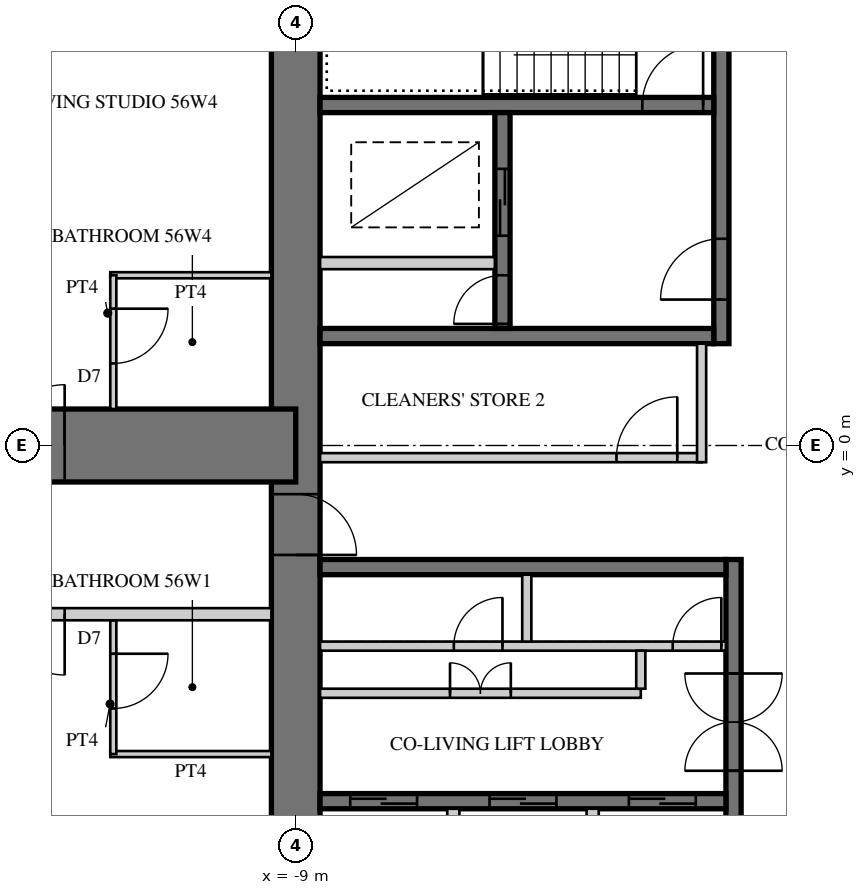
"""IFC4 building model, lengths in metres.
Left out: names, types, materials, properties, quantities, classifications, styles, units other than length and angle.
Written with IfcOpenShell. Run it as: python <this file> out.ifc"""

import sys

from ifc_helpers import new_model, si_unit, direction, frame, frame_2d, origin, place, context, subcontext, project, spatial, rectangle, extrude, element, fill, save


model = new_model("IFC4")
c1 = context("Model", 3, precision=1e-05, world=origin(), true_north=direction((0.0, 1.0)))
c2 = subcontext(c1, "Body", "Model", "MODEL_VIEW")
j1 = project(units=[si_unit("LENGTHUNIT", "METRE"), si_unit("PLANEANGLEUNIT", "RADIAN")], contexts=[c1])
p1 = place(None, origin())
s1 = spatial("IfcSite", under=j1, at=p1, CompositionType="ELEMENT")
p2 = place(p1, origin())
s2 = spatial("IfcBuilding", under=s1, at=p2, CompositionType="ELEMENT")
p3 = place(p2, frame((0.0, 0.0, 222.1)))
s3 = spatial("IfcBuildingStorey", under=s2, at=p3, CompositionType="ELEMENT", Elevation=222.1)
p4 = place(p3, frame((-9.0, 9.0, 0.0), z_axis=(0.0, 0.0, 1.0), x_axis=(0.0, -1.0, 0.0)))
e1 = element("IfcWall", 1, at=p4, inside=s3, PredefinedType="SHEAR", context=c2, shape_type="SweptSolid", body=[
    extrude(rectangle(XDim=18.0, YDim=0.8, at=frame_2d((9.0, 0.0))), origin(), (0.0, 0.0, 1.0), 3.4),
])
p5 = place(p4, frame((9.8, 0.0, 0.0)))
e2 = element("IfcOpeningElement", 2, at=p5, cuts=e1, PredefinedType="OPENING", context=c2, shape_type="SweptSolid", body=[
    extrude(rectangle(XDim=1.0, YDim=2.4, at=frame_2d((0.5, 1.2))), frame((0.0, 0.41, 0.0), z_axis=(0.0, -1.0, 0.0), x_axis=(1.0, 0.0, 0.0)), (0.0, 0.0, 1.0), 0.82),
])
p6 = place(p3, frame((-2.0, 1.675, 0.0), z_axis=(0.0, 0.0, 1.0), x_axis=(0.0, 1.0, 0.0)))
e3 = element("IfcWall", 3, at=p6, inside=s3, PredefinedType="SHEAR", context=c2, shape_type="SweptSolid", body=[
    extrude(rectangle(XDim=6.925, YDim=0.25, at=frame_2d((3.462, 0.0))), origin(), (0.0, 0.0, 1.0), 3.4),
])
p7 = place(p6, frame((0.725, 0.0, 0.0)))
e4 = element("IfcOpeningElement", 4, at=p7, cuts=e3, PredefinedType="OPENING", context=c2, shape_type="SweptSolid", body=[
    extrude(rectangle(XDim=1.0, YDim=2.1, at=frame_2d((0.5, 1.05))), frame((0.0, 0.135, 0.0), z_axis=(0.0, -1.0, 0.0), x_axis=(1.0, 0.0, 0.0)), (0.0, 0.0, 1.0), 0.27),
])
p8 = place(p3, frame((-2.125, 1.8, 0.0), z_axis=(0.0, 0.0, 1.0), x_axis=(-1.0, 0.0, 0.0)))
e5 = element("IfcWall", 5, at=p8, inside=s3, PredefinedType="SHEAR", context=c2, shape_type="SweptSolid", body=[
    extrude(rectangle(XDim=6.475, YDim=0.25, at=frame_2d((3.238, 0.0))), origin(), (0.0, 0.0, 1.0), 3.4),
])
p9 = place(p3, frame((-2.125, 5.6, 0.0), z_axis=(0.0, 0.0, 1.0), x_axis=(-1.0, 0.0, 0.0)))
e6 = element("IfcWall", 6, at=p9, inside=s3, PredefinedType="SHEAR", context=c2, shape_type="SweptSolid", body=[
    extrude(rectangle(XDim=6.475, YDim=0.25, at=frame_2d((3.238, 0.0))), origin(), (0.0, 0.0, 1.0), 3.4),
])
p10 = place(p9, frame((0.175, 0.0, 0.0)))
e7 = element("IfcOpeningElement", 7, at=p10, cuts=e6, PredefinedType="OPENING", context=c2, shape_type="SweptSolid", body=[
    extrude(rectangle(XDim=1.0, YDim=2.1, at=frame_2d((0.5, 1.05))), frame((0.0, 0.135, 0.0), z_axis=(0.0, -1.0, 0.0), x_axis=(1.0, 0.0, 0.0)), (0.0, 0.0, 1.0), 0.27),
])
p11 = place(p3, frame((-5.6, 1.925, 0.0), z_axis=(0.0, 0.0, 1.0), x_axis=(0.0, 1.0, 0.0)))
e8 = element("IfcWall", 8, at=p11, inside=s3, PredefinedType="SHEAR", context=c2, shape_type="SweptSolid", body=[
    extrude(rectangle(XDim=3.55, YDim=0.25, at=frame_2d((1.775, 0.0))), origin(), (0.0, 0.0, 1.0), 3.4),
])
p12 = place(p11, frame((1.525, 0.0, 0.0)))
e9 = element("IfcOpeningElement", 9, at=p12, cuts=e8, PredefinedType="OPENING", context=c2, shape_type="SweptSolid", body=[
    extrude(rectangle(XDim=1.1, YDim=2.2, at=frame_2d((0.55, 1.1))), frame((0.0, 0.135, 0.0), z_axis=(0.0, -1.0, 0.0), x_axis=(1.0, 0.0, 0.0)), (0.0, 0.0, 1.0), 0.27),
])
p13 = place(p11, frame((0.075, 0.0, 0.0)))
e10 = element("IfcOpeningElement", 10, at=p13, cuts=e8, PredefinedType="OPENING", context=c2, shape_type="SweptSolid", body=[
    extrude(rectangle(XDim=0.8, YDim=2.1, at=frame_2d((0.4, 1.05))), frame((0.0, 0.135, 0.0), z_axis=(0.0, -1.0, 0.0), x_axis=(1.0, 0.0, 0.0)), (0.0, 0.0, 1.0), 0.27),
])
p14 = place(p3, frame((-5.725, 3.0, 0.0), z_axis=(0.0, 0.0, 1.0), x_axis=(-1.0, 0.0, 0.0)))
e11 = element("IfcWall", 11, at=p14, inside=s3, PredefinedType="PARTITIONING", context=c2, shape_type="SweptSolid", body=[
    extrude(rectangle(XDim=2.875, YDim=0.2, at=frame_2d((1.438, 0.0))), origin(), (0.0, 0.0, 1.0), 3.4),
])
p15 = place(p3, frame((-1.8, -1.875, 0.0), z_axis=(0.0, 0.0, 1.0), x_axis=(0.0, -1.0, 0.0)))
e12 = element("IfcWall", 12, at=p15, inside=s3, PredefinedType="SHEAR", context=c2, shape_type="SweptSolid", body=[
    extrude(rectangle(XDim=6.725, YDim=0.25, at=frame_2d((3.363, 0.0))), origin(), (0.0, 0.0, 1.0), 3.4),
])
p16 = place(p15, frame((1.875, 0.0, 0.0)))
e13 = element("IfcOpeningElement", 13, at=p16, cuts=e12, PredefinedType="OPENING", context=c2, shape_type="SweptSolid", body=[
    extrude(rectangle(XDim=1.6, YDim=2.4, at=frame_2d((0.8, 1.2))), frame((0.0, 0.135, 0.0), z_axis=(0.0, -1.0, 0.0), x_axis=(1.0, 0.0, 0.0)), (0.0, 0.0, 1.0), 0.27),
])
p17 = place(p3, frame((-1.925, -2.0, 0.0), z_axis=(0.0, 0.0, 1.0), x_axis=(-1.0, 0.0, 0.0)))
e14 = element("IfcWall", 14, at=p17, inside=s3, PredefinedType="SHEAR", context=c2, shape_type="SweptSolid", body=[
    extrude(rectangle(XDim=6.675, YDim=0.25, at=frame_2d((3.337, 0.0))), origin(), (0.0, 0.0, 1.0), 3.4),
])
p18 = place(p3, frame((-1.925, -5.85, 0.0), z_axis=(0.0, 0.0, 1.0), x_axis=(-1.0, 0.0, 0.0)))
e15 = element("IfcWall", 15, at=p18, inside=s3, PredefinedType="SHEAR", context=c2, shape_type="SweptSolid", body=[
    extrude(rectangle(XDim=6.675, YDim=0.25, at=frame_2d((3.337, 0.0))), origin(), (0.0, 0.0, 1.0), 3.4),
])
p19 = place(p18, frame((0.496, 0.0, 0.0)))
e16 = element("IfcOpeningElement", 16, at=p19, cuts=e15, PredefinedType="OPENING", context=c2, shape_type="SweptSolid", body=[
    extrude(rectangle(XDim=1.1, YDim=2.2, at=frame_2d((0.55, 1.1))), frame((0.0, 0.135, 0.0), z_axis=(0.0, -1.0, 0.0), x_axis=(1.0, 0.0, 0.0)), (0.0, 0.0, 1.0), 0.27),
])
p20 = place(p18, frame((2.788, 0.0, 0.0)))
e17 = element("IfcOpeningElement", 17, at=p20, cuts=e15, PredefinedType="OPENING", context=c2, shape_type="SweptSolid", body=[
    extrude(rectangle(XDim=1.1, YDim=2.2, at=frame_2d((0.55, 1.1))), frame((0.0, 0.135, 0.0), z_axis=(0.0, -1.0, 0.0), x_axis=(1.0, 0.0, 0.0)), (0.0, 0.0, 1.0), 0.27),
])
p21 = place(p18, frame((5.079, 0.0, 0.0)))
e18 = element("IfcOpeningElement", 18, at=p21, cuts=e15, PredefinedType="OPENING", context=c2, shape_type="SweptSolid", body=[
    extrude(rectangle(XDim=1.1, YDim=2.2, at=frame_2d((0.55, 1.1))), frame((0.0, 0.135, 0.0), z_axis=(0.0, -1.0, 0.0), x_axis=(1.0, 0.0, 0.0)), (0.0, 0.0, 1.0), 0.27),
])
p22 = place(p3, frame((-1.925, -3.3, 0.0), z_axis=(0.0, 0.0, 1.0), x_axis=(-1.0, 0.0, 0.0)))
e19 = element("IfcWall", 19, at=p22, inside=s3, PredefinedType="PARTITIONING", context=c2, shape_type="SweptSolid", body=[
    extrude(rectangle(XDim=6.675, YDim=0.15, at=frame_2d((3.337, 0.0))), origin(), (0.0, 0.0, 1.0), 3.4),
])
p23 = place(p22, frame((0.075, 0.0, 0.0)))
e20 = element("IfcOpeningElement", 20, at=p23, cuts=e19, PredefinedType="OPENING", context=c2, shape_type="SweptSolid", body=[
    extrude(rectangle(XDim=0.8, YDim=2.1, at=frame_2d((0.4, 1.05))), frame((0.0, 0.085, 0.0), z_axis=(0.0, -1.0, 0.0), x_axis=(1.0, 0.0, 0.0)), (0.0, 0.0, 1.0), 0.17),
])
p24 = place(p22, frame((3.675, 0.0, 0.0)))
e21 = element("IfcOpeningElement", 21, at=p24, cuts=e19, PredefinedType="OPENING", context=c2, shape_type="SweptSolid", body=[
    extrude(rectangle(XDim=0.8, YDim=2.1, at=frame_2d((0.4, 1.05))), frame((0.0, 0.085, 0.0), z_axis=(0.0, -1.0, 0.0), x_axis=(1.0, 0.0, 0.0)), (0.0, 0.0, 1.0), 0.17),
])
p25 = place(p3, frame((-5.2, -2.125, 0.0), z_axis=(0.0, 0.0, 1.0), x_axis=(0.0, -1.0, 0.0)))
e22 = element("IfcWall", 22, at=p25, inside=s3, PredefinedType="PARTITIONING", context=c2, shape_type="SweptSolid", body=[
    extrude(rectangle(XDim=1.1, YDim=0.15, at=frame_2d((0.55, 0.0))), origin(), (0.0, 0.0, 1.0), 3.4),
])
for number, where, z_axis, x_axis in (
    (23, (-4.117, -5.975, 0.0), (0.0, 0.0, 1.0), (0.0, -1.0, 0.0)),
    (24, (-6.408, -5.975, 0.0), (0.0, 0.0, 1.0), (0.0, -1.0, 0.0)),
):
    element("IfcWall", number, at=place(p3, frame(where, z_axis=z_axis, x_axis=x_axis)), inside=s3, PredefinedType="PARTITIONING", context=c2, shape_type="SweptSolid", body=[
        extrude(rectangle(XDim=2.625, YDim=0.2, at=frame_2d((1.312, 0.0))), origin(), (0.0, 0.0, 1.0), 3.4),
    ])
p26 = place(p3, frame((-9.0, 0.0, 0.0), z_axis=(0.0, 0.0, 1.0), x_axis=(-1.0, 0.0, 0.0)))
e25 = element("IfcWall", 25, at=p26, inside=s3, PredefinedType="SHEAR", context=c2, shape_type="SweptSolid", body=[
    extrude(rectangle(XDim=18.0, YDim=1.2, at=frame_2d((9.0, 0.0))), origin(), (0.0, 0.0, 1.0), 3.4),
])
p27 = place(p26, frame((3.8, 0.0, 0.0)))
e26 = element("IfcOpeningElement", 26, at=p27, cuts=e25, PredefinedType="OPENING", context=c2, shape_type="SweptSolid", body=[
    extrude(rectangle(XDim=1.0, YDim=2.15, at=frame_2d((0.5, 1.075))), frame((0.0, 0.61, 0.0), z_axis=(0.0, -1.0, 0.0), x_axis=(1.0, 0.0, 0.0)), (0.0, 0.0, 1.0), 1.22),
])
p28 = place(p26, frame((6.6, 0.0, 0.0)))
e27 = element("IfcOpeningElement", 27, at=p28, cuts=e25, PredefinedType="OPENING", context=c2, shape_type="SweptSolid", body=[
    extrude(rectangle(XDim=1.0, YDim=2.15, at=frame_2d((0.5, 1.075))), frame((0.0, 0.61, 0.0), z_axis=(0.0, -1.0, 0.0), x_axis=(1.0, 0.0, 0.0)), (0.0, 0.0, 1.0), 1.22),
])
p29 = place(p26, frame((13.3, 0.0, 0.0)))
e28 = element("IfcOpeningElement", 28, at=p29, cuts=e25, PredefinedType="OPENING", context=c2, shape_type="SweptSolid", body=[
    extrude(rectangle(XDim=1.0, YDim=2.2, at=frame_2d((0.5, 1.1))), frame((0.0, 0.61, 0.0), z_axis=(0.0, -1.0, 0.0), x_axis=(1.0, 0.0, 0.0)), (0.0, 0.0, 1.0), 1.22),
])
p30 = place(p3, frame((-2.325, -0.2, 0.0), z_axis=(0.0, 0.0, 1.0), x_axis=(-1.0, 0.0, 0.0)))
e29 = element("IfcWall", 29, at=p30, inside=s3, PredefinedType="PARTITIONING", context=c2, shape_type="SweptSolid", body=[
    extrude(rectangle(XDim=6.275, YDim=0.15, at=frame_2d((3.138, 0.0))), origin(), (0.0, 0.0, 1.0), 3.22),
])
p31 = place(p30, frame((0.4, 0.0, 0.0)))
e30 = element("IfcOpeningElement", 30, at=p31, cuts=e29, PredefinedType="OPENING", context=c2, shape_type="SweptSolid", body=[
    extrude(rectangle(XDim=1.0, YDim=2.1, at=frame_2d((0.5, 1.05))), frame((0.0, 0.085, 0.0), z_axis=(0.0, -1.0, 0.0), x_axis=(1.0, 0.0, 0.0)), (0.0, 0.0, 1.0), 0.17),
])
p32 = place(p3, frame((-2.325, 1.675, 0.0), z_axis=(0.0, 0.0, 1.0), x_axis=(0.0, -1.0, 0.0)))
e31 = element("IfcWall", 31, at=p32, inside=s3, PredefinedType="PARTITIONING", context=c2, shape_type="SweptSolid", body=[
    extrude(rectangle(XDim=1.95, YDim=0.15, at=frame_2d((0.975, 0.0))), origin(), (0.0, 0.0, 1.0), 3.22),
])
p33 = place(p3, frame((-3.325, -4.075, 0.0), z_axis=(0.0, 0.0, 1.0), x_axis=(-1.0, 0.0, 0.0)))
e32 = element("IfcWall", 32, at=p33, inside=s3, PredefinedType="PARTITIONING", context=c2, shape_type="SweptSolid", body=[
    extrude(rectangle(XDim=5.275, YDim=0.15, at=frame_2d((2.638, 0.0))), origin(), (0.0, 0.0, 1.0), 3.22),
])
p34 = place(p33, frame((2.137, 0.0, 0.0)))
e33 = element("IfcOpeningElement", 33, at=p34, cuts=e32, PredefinedType="OPENING", context=c2, shape_type="SweptSolid", body=[
    extrude(rectangle(XDim=1.0, YDim=2.1, at=frame_2d((0.5, 1.05))), frame((0.0, 0.085, 0.0), z_axis=(0.0, -1.0, 0.0), x_axis=(1.0, 0.0, 0.0)), (0.0, 0.0, 1.0), 0.17),
])
p35 = place(p3, frame((-3.325, -3.375, 0.0), z_axis=(0.0, 0.0, 1.0), x_axis=(0.0, -1.0, 0.0)))
e34 = element("IfcWall", 34, at=p35, inside=s3, PredefinedType="PARTITIONING", context=c2, shape_type="SweptSolid", body=[
    extrude(rectangle(XDim=0.625, YDim=0.15, at=frame_2d((0.312, 0.0))), origin(), (0.0, 0.0, 1.0), 3.22),
])
p36 = place(p3, frame((-9.4, -5.075, 0.0), z_axis=(0.0, 0.0, 1.0), x_axis=(-1.0, 0.0, 0.0)))
e35 = element("IfcWall", 35, at=p36, inside=s3, PredefinedType="PARTITIONING", context=c2, shape_type="SweptSolid", body=[
    extrude(rectangle(XDim=2.65, YDim=0.1, at=frame_2d((1.325, 0.0))), origin(), (0.0, 0.0, 1.0), 3.22),
])
p37 = place(p3, frame((-12.0, -2.875, 0.0), z_axis=(0.0, 0.0, 1.0), x_axis=(0.0, -1.0, 0.0)))
e36 = element("IfcWall", 36, at=p37, inside=s3, PredefinedType="PARTITIONING", context=c2, shape_type="SweptSolid", body=[
    extrude(rectangle(XDim=2.2, YDim=0.1, at=frame_2d((1.1, 0.0))), origin(), (0.0, 0.0, 1.0), 3.22),
])
p38 = place(p37, frame((0.55, 0.0, 0.0)))
e37 = element("IfcOpeningElement", 37, at=p38, cuts=e36, PredefinedType="OPENING", context=c2, shape_type="SweptSolid", body=[
    extrude(rectangle(XDim=0.9, YDim=2.1, at=frame_2d((0.45, 1.05))), frame((0.0, 0.06, 0.0), z_axis=(0.0, -1.0, 0.0), x_axis=(1.0, 0.0, 0.0)), (0.0, 0.0, 1.0), 0.12),
])
p39 = place(p3, frame((-9.4, 2.8, 0.0), z_axis=(0.0, 0.0, 1.0), x_axis=(-1.0, 0.0, 0.0)))
e38 = element("IfcWall", 38, at=p39, inside=s3, PredefinedType="PARTITIONING", context=c2, shape_type="SweptSolid", body=[
    extrude(rectangle(XDim=2.65, YDim=0.1, at=frame_2d((1.325, 0.0))), origin(), (0.0, 0.0, 1.0), 3.22),
])
p40 = place(p3, frame((-12.0, 2.8, 0.0), z_axis=(0.0, 0.0, 1.0), x_axis=(0.0, -1.0, 0.0)))
e39 = element("IfcWall", 39, at=p40, inside=s3, PredefinedType="PARTITIONING", context=c2, shape_type="SweptSolid", body=[
    extrude(rectangle(XDim=2.2, YDim=0.1, at=frame_2d((1.1, 0.0))), origin(), (0.0, 0.0, 1.0), 3.22),
])
p41 = place(p40, frame((0.55, 0.0, 0.0)))
e40 = element("IfcOpeningElement", 40, at=p41, cuts=e39, PredefinedType="OPENING", context=c2, shape_type="SweptSolid", body=[
    extrude(rectangle(XDim=0.9, YDim=2.1, at=frame_2d((0.45, 1.05))), frame((0.0, 0.06, 0.0), z_axis=(0.0, -1.0, 0.0), x_axis=(1.0, 0.0, 0.0)), (0.0, 0.0, 1.0), 0.12),
])
p42 = place(p3, frame((-9.4, -2.775, 0.0), z_axis=(0.0, 0.0, 1.0), x_axis=(-1.0, 0.0, 0.0)))
e41 = element("IfcWall", 41, at=p42, inside=s3, PredefinedType="SOLIDWALL", context=c2, shape_type="SweptSolid", body=[
    extrude(rectangle(XDim=11.6, YDim=0.2, at=frame_2d((5.8, 0.0))), origin(), (0.0, 0.0, 1.0), 3.22),
])
p43 = place(p42, frame((3.4, 0.0, 0.0)))
e42 = element("IfcOpeningElement", 42, at=p43, cuts=e41, PredefinedType="OPENING", context=c2, shape_type="SweptSolid", body=[
    extrude(rectangle(XDim=1.0, YDim=2.15, at=frame_2d((0.5, 1.075))), frame((0.0, 0.11, 0.0), z_axis=(0.0, -1.0, 0.0), x_axis=(1.0, 0.0, 0.0)), (0.0, 0.0, 1.0), 0.22),
])
p44 = place(p42, frame((6.2, 0.0, 0.0)))
e43 = element("IfcOpeningElement", 43, at=p44, cuts=e41, PredefinedType="OPENING", context=c2, shape_type="SweptSolid", body=[
    extrude(rectangle(XDim=1.0, YDim=2.15, at=frame_2d((0.5, 1.075))), frame((0.0, 0.11, 0.0), z_axis=(0.0, -1.0, 0.0), x_axis=(1.0, 0.0, 0.0)), (0.0, 0.0, 1.0), 0.22),
])
p45 = place(p31, frame((1.0, 0.0, 0.0), z_axis=(0.0, 0.0, 1.0), x_axis=(-1.0, 0.0, 0.0)))
e44 = element("IfcDoor", 44, at=p45, inside=s3, OperationType="SINGLE_SWING_RIGHT", PredefinedType="DOOR", context=c2, shape_type="SweptSolid", body=[
    extrude(rectangle(XDim=1.0, YDim=2.1, at=frame_2d((0.5, 1.05))), frame((0.0, 0.025, 0.0), z_axis=(0.0, -1.0, 0.0), x_axis=(1.0, 0.0, 0.0)), (0.0, 0.0, 1.0), 0.05),
])
fill(e30, e44)
p46 = place(p34, frame((1.0, 0.0, 0.0), z_axis=(0.0, 0.0, 1.0), x_axis=(-1.0, 0.0, 0.0)))
e45 = element("IfcDoor", 45, at=p46, inside=s3, OperationType="DOUBLE_DOOR_SINGLE_SWING", PredefinedType="DOOR", context=c2, shape_type="SweptSolid", body=[
    extrude(rectangle(XDim=1.0, YDim=2.1, at=frame_2d((0.5, 1.05))), frame((0.0, 0.025, 0.0), z_axis=(0.0, -1.0, 0.0), x_axis=(1.0, 0.0, 0.0)), (0.0, 0.0, 1.0), 0.05),
])
fill(e33, e45)
p47 = place(p38, origin())
e46 = element("IfcDoor", 46, at=p47, inside=s3, OperationType="SINGLE_SWING_LEFT", PredefinedType="DOOR", context=c2, shape_type="SweptSolid", body=[
    extrude(rectangle(XDim=0.9, YDim=2.1, at=frame_2d((0.45, 1.05))), frame((0.0, 0.025, 0.0), z_axis=(0.0, -1.0, 0.0), x_axis=(1.0, 0.0, 0.0)), (0.0, 0.0, 1.0), 0.05),
])
fill(e37, e46)
p48 = place(p41, origin())
e47 = element("IfcDoor", 47, at=p48, inside=s3, OperationType="SINGLE_SWING_LEFT", PredefinedType="DOOR", context=c2, shape_type="SweptSolid", body=[
    extrude(rectangle(XDim=0.9, YDim=2.1, at=frame_2d((0.45, 1.05))), frame((0.0, 0.025, 0.0), z_axis=(0.0, -1.0, 0.0), x_axis=(1.0, 0.0, 0.0)), (0.0, 0.0, 1.0), 0.05),
])
fill(e40, e47)
p49 = place(p43, origin())
e48 = element("IfcDoor", 48, at=p49, inside=s3, OperationType="SINGLE_SWING_LEFT", PredefinedType="DOOR", context=c2, shape_type="SweptSolid", body=[
    extrude(rectangle(XDim=1.0, YDim=2.15, at=frame_2d((0.5, 1.075))), frame((0.0, 0.025, 0.0), z_axis=(0.0, -1.0, 0.0), x_axis=(1.0, 0.0, 0.0)), (0.0, 0.0, 1.0), 0.05),
])
fill(e42, e48)
p50 = place(p27, frame((1.0, 0.0, 0.0), z_axis=(0.0, 0.0, 1.0), x_axis=(-1.0, 0.0, 0.0)))
e49 = element("IfcDoor", 49, at=p50, inside=s3, OperationType="SINGLE_SWING_RIGHT", PredefinedType="DOOR", context=c2, shape_type="SweptSolid", body=[
    extrude(rectangle(XDim=1.0, YDim=2.15, at=frame_2d((0.5, 1.075))), frame((0.0, 0.025, 0.0), z_axis=(0.0, -1.0, 0.0), x_axis=(1.0, 0.0, 0.0)), (0.0, 0.0, 1.0), 0.05),
])
fill(e26, e49)
p51 = place(p5, origin())
e50 = element("IfcDoor", 50, at=p51, inside=s3, OperationType="SINGLE_SWING_RIGHT", PredefinedType="DOOR", context=c2, shape_type="SweptSolid", body=[
    extrude(rectangle(XDim=1.0, YDim=2.4, at=frame_2d((0.5, 1.2))), frame((0.0, 0.055, 0.0), z_axis=(0.0, -1.0, 0.0), x_axis=(1.0, 0.0, 0.0)), (0.0, 0.0, 1.0), 0.05),
])
fill(e2, e50)
p52 = place(p7, origin())
e51 = element("IfcDoor", 51, at=p52, inside=s3, OperationType="SINGLE_SWING_LEFT", PredefinedType="DOOR", context=c2, shape_type="SweptSolid", body=[
    extrude(rectangle(XDim=1.0, YDim=2.1, at=frame_2d((0.5, 1.05))), frame((0.0, 0.025, 0.0), z_axis=(0.0, -1.0, 0.0), x_axis=(1.0, 0.0, 0.0)), (0.0, 0.0, 1.0), 0.05),
])
fill(e4, e51)
p53 = place(p10, frame((1.0, 0.0, 0.0), z_axis=(0.0, 0.0, 1.0), x_axis=(-1.0, 0.0, 0.0)))
e52 = element("IfcDoor", 52, at=p53, inside=s3, OperationType="SINGLE_SWING_RIGHT", PredefinedType="DOOR", context=c2, shape_type="SweptSolid", body=[
    extrude(rectangle(XDim=1.0, YDim=2.1, at=frame_2d((0.5, 1.05))), frame((0.0, 0.025, 0.0), z_axis=(0.0, -1.0, 0.0), x_axis=(1.0, 0.0, 0.0)), (0.0, 0.0, 1.0), 0.05),
])
fill(e7, e52)
p54 = place(p12, origin())
e53 = element("IfcDoor", 53, at=p54, inside=s3, OperationType="DOUBLE_DOOR_SLIDING", PredefinedType="DOOR", context=c2, shape_type="SweptSolid", body=[
    extrude(rectangle(XDim=1.1, YDim=2.2, at=frame_2d((0.55, 1.1))), frame((0.0, 0.025, 0.0), z_axis=(0.0, -1.0, 0.0), x_axis=(1.0, 0.0, 0.0)), (0.0, 0.0, 1.0), 0.05),
])
fill(e9, e53)
p55 = place(p13, origin())
e54 = element("IfcDoor", 54, at=p55, inside=s3, OperationType="SINGLE_SWING_LEFT", PredefinedType="DOOR", context=c2, shape_type="SweptSolid", body=[
    extrude(rectangle(XDim=0.8, YDim=2.1, at=frame_2d((0.4, 1.05))), frame((0.0, 0.025, 0.0), z_axis=(0.0, -1.0, 0.0), x_axis=(1.0, 0.0, 0.0)), (0.0, 0.0, 1.0), 0.05),
])
fill(e10, e54)
p56 = place(p19, origin())
e55 = element("IfcDoor", 55, at=p56, inside=s3, OperationType="DOUBLE_DOOR_SLIDING", PredefinedType="DOOR", context=c2, shape_type="SweptSolid", body=[
    extrude(rectangle(XDim=1.1, YDim=2.2, at=frame_2d((0.55, 1.1))), frame((0.0, 0.025, 0.0), z_axis=(0.0, -1.0, 0.0), x_axis=(1.0, 0.0, 0.0)), (0.0, 0.0, 1.0), 0.05),
])
fill(e16, e55)
p57 = place(p20, origin())
e56 = element("IfcDoor", 56, at=p57, inside=s3, OperationType="DOUBLE_DOOR_SLIDING", PredefinedType="DOOR", context=c2, shape_type="SweptSolid", body=[
    extrude(rectangle(XDim=1.1, YDim=2.2, at=frame_2d((0.55, 1.1))), frame((0.0, 0.025, 0.0), z_axis=(0.0, -1.0, 0.0), x_axis=(1.0, 0.0, 0.0)), (0.0, 0.0, 1.0), 0.05),
])
fill(e17, e56)
p58 = place(p21, origin())
e57 = element("IfcDoor", 57, at=p58, inside=s3, OperationType="DOUBLE_DOOR_SLIDING", PredefinedType="DOOR", context=c2, shape_type="SweptSolid", body=[
    extrude(rectangle(XDim=1.1, YDim=2.2, at=frame_2d((0.55, 1.1))), frame((0.0, 0.025, 0.0), z_axis=(0.0, -1.0, 0.0), x_axis=(1.0, 0.0, 0.0)), (0.0, 0.0, 1.0), 0.05),
])
fill(e18, e57)
p59 = place(p16, origin())
e58 = element("IfcDoor", 58, at=p59, inside=s3, OperationType="DOUBLE_DOOR_DOUBLE_SWING", PredefinedType="DOOR", context=c2, shape_type="SweptSolid", body=[
    extrude(rectangle(XDim=1.6, YDim=2.4, at=frame_2d((0.8, 1.2))), frame((0.0, 0.025, 0.0), z_axis=(0.0, -1.0, 0.0), x_axis=(1.0, 0.0, 0.0)), (0.0, 0.0, 1.0), 0.05),
])
fill(e13, e58)
p60 = place(p23, frame((0.8, 0.0, 0.0), z_axis=(0.0, 0.0, 1.0), x_axis=(-1.0, 0.0, 0.0)))
e59 = element("IfcDoor", 59, at=p60, inside=s3, OperationType="SINGLE_SWING_RIGHT", PredefinedType="DOOR", context=c2, shape_type="SweptSolid", body=[
    extrude(rectangle(XDim=0.8, YDim=2.1, at=frame_2d((0.4, 1.05))), frame((0.0, 0.025, 0.0), z_axis=(0.0, -1.0, 0.0), x_axis=(1.0, 0.0, 0.0)), (0.0, 0.0, 1.0), 0.05),
])
fill(e20, e59)
p61 = place(p24, frame((0.8, 0.0, 0.0), z_axis=(0.0, 0.0, 1.0), x_axis=(-1.0, 0.0, 0.0)))
e60 = element("IfcDoor", 60, at=p61, inside=s3, OperationType="SINGLE_SWING_RIGHT", PredefinedType="DOOR", context=c2, shape_type="SweptSolid", body=[
    extrude(rectangle(XDim=0.8, YDim=2.1, at=frame_2d((0.4, 1.05))), frame((0.0, 0.025, 0.0), z_axis=(0.0, -1.0, 0.0), x_axis=(1.0, 0.0, 0.0)), (0.0, 0.0, 1.0), 0.05),
])
fill(e21, e60)
save(model, sys.argv[1])
